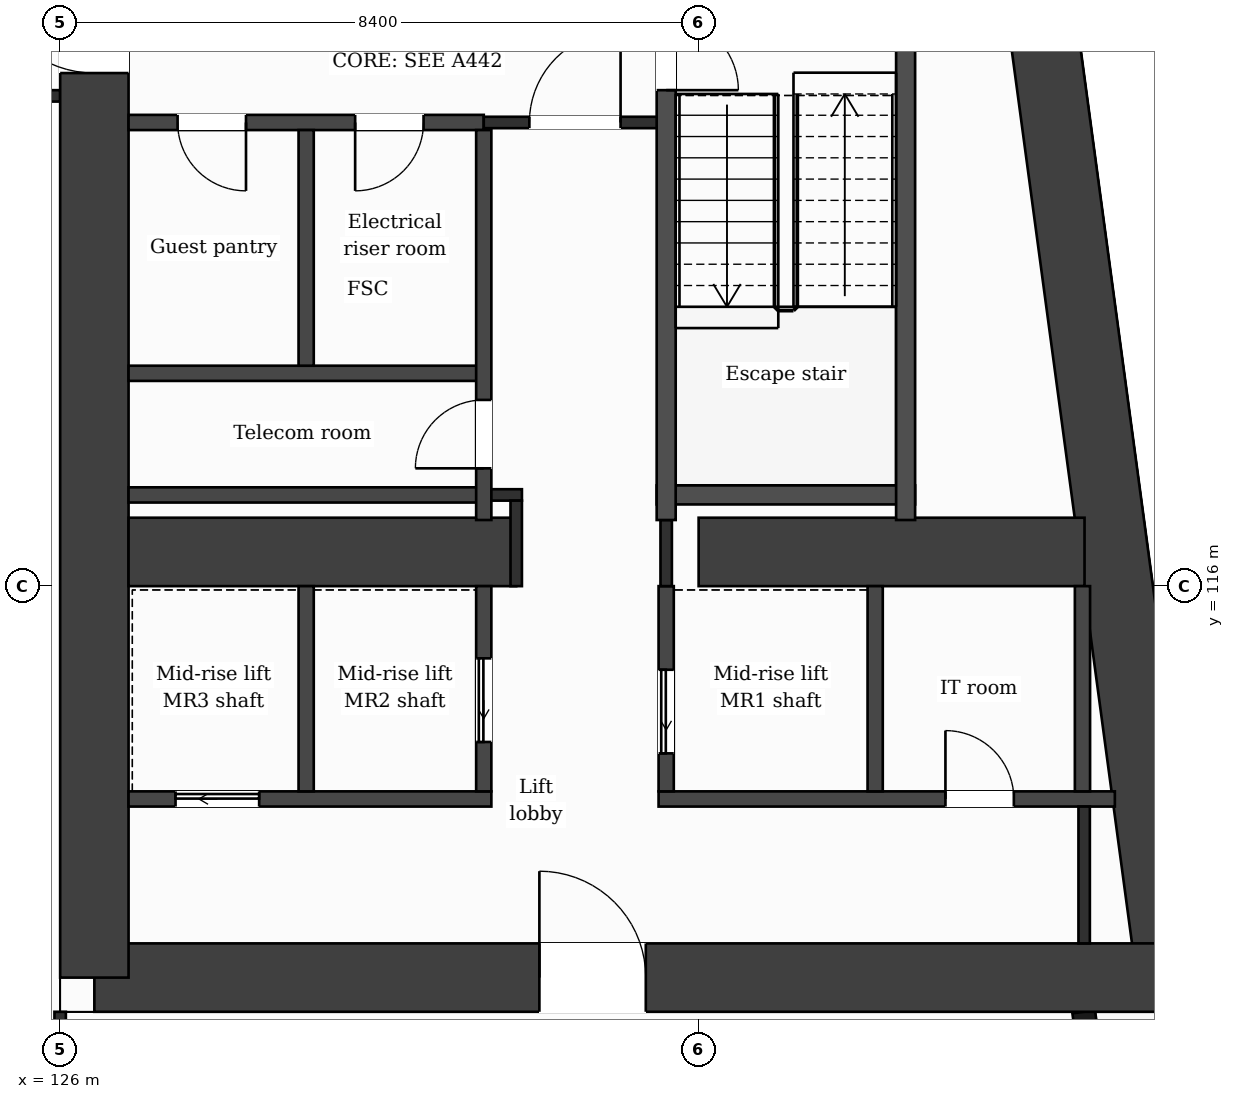
"""IFC4 building model, lengths in metres.
Left out: names, types, materials, properties, quantities, classifications, styles, units other than length and angle.
Written with IfcOpenShell. Run it as: python <this file> out.ifc"""

import sys

from ifc_helpers import new_model, si_unit, direction, frame, frame_2d, origin, place, context, subcontext, project, spatial, rectangle, extrude, element, fill, save


model = new_model("IFC4")
c1 = context("Model", 3, precision=1e-05, world=origin(), true_north=direction((0.0, 1.0)))
c2 = subcontext(c1, "Body", "Model", "MODEL_VIEW")
j1 = project(units=[si_unit("LENGTHUNIT", "METRE"), si_unit("PLANEANGLEUNIT", "RADIAN")], contexts=[c1])
p1 = place(None, origin())
s1 = spatial("IfcSite", under=j1, at=p1, CompositionType="ELEMENT")
p2 = place(p1, origin())
s2 = spatial("IfcBuilding", under=s1, at=p2, CompositionType="ELEMENT")
p3 = place(p2, frame((0.0, 0.0, 173.7)))
s3 = spatial("IfcBuildingStorey", under=s2, at=p3, CompositionType="ELEMENT", Elevation=173.7)
p4 = place(p3, frame((137.776, 131.95, 0.0), z_axis=(0.0, 0.0, 1.0), x_axis=(0.133421759112, -0.991059349482, 0.0)))
e1 = element("IfcWall", 1, at=p4, inside=s3, PredefinedType="SHEAR", context=c2, shape_type="SweptSolid", body=[
    extrude(rectangle(XDim=21.29, YDim=0.9, at=frame_2d((10.645, 0.0))), origin(), (0.0, 0.0, 1.0), 3.7),
])
p5 = place(p3, frame((140.616, 110.85, 0.0), z_axis=(0.0, 0.0, 1.0), x_axis=(-1.0, 0.0, 0.0)))
e2 = element("IfcWall", 2, at=p5, inside=s3, PredefinedType="SHEAR", context=c2, shape_type="SweptSolid", body=[
    extrude(rectangle(XDim=14.166, YDim=0.9, at=frame_2d((7.083, 0.0))), origin(), (0.0, 0.0, 1.0), 3.7),
])
p6 = place(p5, frame((6.911, 0.0, 0.0)))
e3 = element("IfcOpeningElement", 3, at=p6, cuts=e2, PredefinedType="OPENING", context=c2, shape_type="SweptSolid", body=[
    extrude(rectangle(XDim=1.4, YDim=2.1, at=frame_2d((0.7, 1.05))), frame((0.0, 0.46, 0.0), z_axis=(0.0, -1.0, 0.0), x_axis=(1.0, 0.0, 0.0)), (0.0, 0.0, 1.0), 0.92),
])
p7 = place(p3, frame((126.45, 110.85, 0.0), z_axis=(0.0, 0.0, 1.0), x_axis=(0.0, 1.0, 0.0)))
e4 = element("IfcWall", 4, at=p7, inside=s3, PredefinedType="SHEAR", context=c2, shape_type="SweptSolid", body=[
    extrude(rectangle(XDim=21.1, YDim=0.9, at=frame_2d((10.55, 0.0))), origin(), (0.0, 0.0, 1.0), 3.7),
])
p8 = place(p7, frame((11.9, 0.0, 0.0)))
e5 = element("IfcOpeningElement", 5, at=p8, cuts=e4, PredefinedType="OPENING", context=c2, shape_type="SweptSolid", body=[
    extrude(rectangle(XDim=1.4, YDim=2.1, at=frame_2d((0.7, 1.05))), frame((0.0, 0.46, 0.0), z_axis=(0.0, -1.0, 0.0), x_axis=(1.0, 0.0, 0.0)), (0.0, 0.0, 1.0), 0.92),
])
p9 = place(p3, frame((126.9, 116.45, 0.0), z_axis=(0.0, 0.0, 1.0), x_axis=(1.0, 0.0, 0.0)))
e6 = element("IfcWall", 6, at=p9, inside=s3, PredefinedType="SHEAR", context=c2, shape_type="SweptSolid", body=[
    extrude(rectangle(XDim=5.1, YDim=0.9, at=frame_2d((2.55, 0.0))), origin(), (0.0, 0.0, 1.0), 3.7),
])
p10 = place(p3, frame((134.4, 116.45, 0.0), z_axis=(0.0, 0.0, 1.0), x_axis=(1.0, 0.0, 0.0)))
e7 = element("IfcWall", 7, at=p10, inside=s3, PredefinedType="SHEAR", context=c2, shape_type="SweptSolid", body=[
    extrude(rectangle(XDim=5.077, YDim=0.9, at=frame_2d((2.539, 0.0))), origin(), (0.0, 0.0, 1.0), 3.7),
])
p11 = place(p3, frame((140.348, 103.85, 0.0), z_axis=(0.0, 0.0, 1.0), x_axis=(-0.133431549479, 0.991058031401, 0.0)))
e8 = element("IfcWall", 8, at=p11, inside=s3, PredefinedType="SOLIDWALL", context=c2, shape_type="SweptSolid", body=[
    extrude(rectangle(XDim=6.609, YDim=0.3, at=frame_2d((3.304, 0.0))), origin(), (0.0, 0.0, 1.0), 3.38),
])
p12 = place(p11, frame((0.737, 0.0, 0.9)))
e9 = element("IfcOpeningElement", 9, at=p12, cuts=e8, PredefinedType="OPENING", context=c2, shape_type="SweptSolid", body=[
    extrude(rectangle(XDim=1.2, YDim=2.1, at=frame_2d((0.6, 1.05))), frame((0.0, 0.16, 0.0), z_axis=(0.0, -1.0, 0.0), x_axis=(1.0, 0.0, 0.0)), (0.0, 0.0, 1.0), 0.32),
])
p13 = place(p11, frame((3.991, 0.0, 0.0)))
e10 = element("IfcOpeningElement", 10, at=p13, cuts=e8, PredefinedType="OPENING", context=c2, shape_type="SweptSolid", body=[
    extrude(rectangle(XDim=1.2, YDim=2.4, at=frame_2d((0.6, 1.2))), frame((0.0, 0.16, 0.0), z_axis=(0.0, -1.0, 0.0), x_axis=(1.0, 0.0, 0.0)), (0.0, 0.0, 1.0), 0.32),
])
p14 = place(p3, frame((126.9, 113.2, 0.0), z_axis=(0.0, 0.0, 1.0), x_axis=(1.0, 0.0, 0.0)))
e11 = element("IfcWall", 11, at=p14, inside=s3, PredefinedType="PARTITIONING", context=c2, shape_type="SweptSolid", body=[
    extrude(rectangle(XDim=4.773, YDim=0.2, at=frame_2d((2.387, 0.0))), origin(), (0.0, 0.0, 1.0), 3.38),
])
p15 = place(p14, frame((0.618, 0.0, 0.0)))
e12 = element("IfcOpeningElement", 12, at=p15, cuts=e11, PredefinedType="OPENING", context=c2, shape_type="SweptSolid", body=[
    extrude(rectangle(XDim=1.1, YDim=2.1, at=frame_2d((0.55, 1.05))), frame((0.0, 0.11, 0.0), z_axis=(0.0, -1.0, 0.0), x_axis=(1.0, 0.0, 0.0)), (0.0, 0.0, 1.0), 0.22),
])
p16 = place(p3, frame((133.873, 113.2, 0.0), z_axis=(0.0, 0.0, 1.0), x_axis=(1.0, 0.0, 0.0)))
e13 = element("IfcWall", 13, at=p16, inside=s3, PredefinedType="PARTITIONING", context=c2, shape_type="SweptSolid", body=[
    extrude(rectangle(XDim=6.003, YDim=0.2, at=frame_2d((3.001, 0.0))), origin(), (0.0, 0.0, 1.0), 3.38),
])
p17 = place(p16, frame((3.774, 0.0, 0.0)))
e14 = element("IfcOpeningElement", 14, at=p17, cuts=e13, PredefinedType="OPENING", context=c2, shape_type="SweptSolid", body=[
    extrude(rectangle(XDim=0.9, YDim=2.1, at=frame_2d((0.45, 1.05))), frame((0.0, 0.11, 0.0), z_axis=(0.0, -1.0, 0.0), x_axis=(1.0, 0.0, 0.0)), (0.0, 0.0, 1.0), 0.22),
])
p18 = place(p3, frame((126.9, 117.2, 0.0), z_axis=(0.0, 0.0, 1.0), x_axis=(1.0, 0.0, 0.0)))
e15 = element("IfcWall", 15, at=p18, inside=s3, PredefinedType="PARTITIONING", context=c2, shape_type="SweptSolid", body=[
    extrude(rectangle(XDim=4.673, YDim=0.2, at=frame_2d((2.336, 0.0))), origin(), (0.0, 0.0, 1.0), 3.38),
])
p19 = place(p3, frame((131.573, 117.2, 0.0), z_axis=(0.0, 0.0, 1.0), x_axis=(1.0, 0.0, 0.0)))
e16 = element("IfcWall", 16, at=p19, inside=s3, PredefinedType="PARTITIONING", context=c2, shape_type="SweptSolid", body=[
    extrude(rectangle(XDim=0.502, YDim=0.15, at=frame_2d((0.251, 0.0))), origin(), (0.0, 0.0, 1.0), 3.38),
])
p20 = place(p3, frame((133.848, 117.2, 0.0), z_axis=(0.0, 0.0, 1.0), x_axis=(1.0, 0.0, 0.0)))
e17 = element("IfcWall", 17, at=p20, inside=s3, PredefinedType="PARTITIONING", context=c2, shape_type="SweptSolid", body=[
    extrude(rectangle(XDim=3.4, YDim=0.25, at=frame_2d((1.7, 0.0))), origin(), (0.0, 0.0, 1.0), 3.38),
])
p21 = place(p3, frame((126.9, 118.8, 0.0), z_axis=(0.0, 0.0, 1.0), x_axis=(1.0, 0.0, 0.0)))
e18 = element("IfcWall", 18, at=p21, inside=s3, PredefinedType="PARTITIONING", context=c2, shape_type="SweptSolid", body=[
    extrude(rectangle(XDim=4.673, YDim=0.2, at=frame_2d((2.336, 0.0))), origin(), (0.0, 0.0, 1.0), 3.38),
])
p22 = place(p3, frame((126.9, 122.1, 0.0), z_axis=(0.0, 0.0, 1.0), x_axis=(1.0, 0.0, 0.0)))
e19 = element("IfcWall", 19, at=p22, inside=s3, PredefinedType="PARTITIONING", context=c2, shape_type="SweptSolid", body=[
    extrude(rectangle(XDim=4.673, YDim=0.2, at=frame_2d((2.336, 0.0))), origin(), (0.0, 0.0, 1.0), 3.38),
])
p23 = place(p22, frame((2.981, 0.0, 0.0)))
e20 = element("IfcOpeningElement", 20, at=p23, cuts=e19, PredefinedType="OPENING", context=c2, shape_type="SweptSolid", body=[
    extrude(rectangle(XDim=0.9, YDim=2.1, at=frame_2d((0.45, 1.05))), frame((0.0, 0.11, 0.0), z_axis=(0.0, -1.0, 0.0), x_axis=(1.0, 0.0, 0.0)), (0.0, 0.0, 1.0), 0.22),
])
p24 = place(p22, frame((0.645, 0.0, 0.0)))
e21 = element("IfcOpeningElement", 21, at=p24, cuts=e19, PredefinedType="OPENING", context=c2, shape_type="SweptSolid", body=[
    extrude(rectangle(XDim=0.9, YDim=2.1, at=frame_2d((0.45, 1.05))), frame((0.0, 0.11, 0.0), z_axis=(0.0, -1.0, 0.0), x_axis=(1.0, 0.0, 0.0)), (0.0, 0.0, 1.0), 0.22),
])
p25 = place(p3, frame((131.573, 122.1, 0.0), z_axis=(0.0, 0.0, 1.0), x_axis=(1.0, 0.0, 0.0)))
e22 = element("IfcWall", 22, at=p25, inside=s3, PredefinedType="PARTITIONING", context=c2, shape_type="SweptSolid", body=[
    extrude(rectangle(XDim=2.4, YDim=0.15, at=frame_2d((1.2, 0.0))), origin(), (0.0, 0.0, 1.0), 3.38),
])
p26 = place(p25, frame((0.6, 0.0, 0.0)))
e23 = element("IfcOpeningElement", 23, at=p26, cuts=e22, PredefinedType="OPENING", context=c2, shape_type="SweptSolid", body=[
    extrude(rectangle(XDim=1.2, YDim=2.1, at=frame_2d((0.6, 1.05))), frame((0.0, 0.085, 0.0), z_axis=(0.0, -1.0, 0.0), x_axis=(1.0, 0.0, 0.0)), (0.0, 0.0, 1.0), 0.17),
])
p27 = place(p3, frame((100.8, 122.45, 0.0), z_axis=(0.0, 0.0, 1.0), x_axis=(1.0, 0.0, 0.0)))
e24 = element("IfcWall", 24, at=p27, inside=s3, PredefinedType="PARTITIONING", context=c2, shape_type="SweptSolid", body=[
    extrude(rectangle(XDim=25.2, YDim=0.15, at=frame_2d((12.6, 0.0))), origin(), (0.0, 0.0, 1.0), 3.38),
])
p28 = place(p3, frame((126.0, 109.075, 0.0), z_axis=(0.0, 0.0, 1.0), x_axis=(0.0, 1.0, 0.0)))
e25 = element("IfcWall", 25, at=p28, inside=s3, PredefinedType="PARTITIONING", context=c2, shape_type="SweptSolid", body=[
    extrude(rectangle(XDim=1.325, YDim=0.15, at=frame_2d((0.663, 0.0))), origin(), (0.0, 0.0, 1.0), 3.38),
])
p29 = place(p3, frame((129.237, 113.3, 0.0), z_axis=(0.0, 0.0, 1.0), x_axis=(0.0, 1.0, 0.0)))
e26 = element("IfcWall", 26, at=p29, inside=s3, PredefinedType="PARTITIONING", context=c2, shape_type="SweptSolid", body=[
    extrude(rectangle(XDim=2.7, YDim=0.2, at=frame_2d((1.35, 0.0))), origin(), (0.0, 0.0, 1.0), 3.38),
])
p30 = place(p3, frame((129.237, 118.9, 0.0), z_axis=(0.0, 0.0, 1.0), x_axis=(0.0, 1.0, 0.0)))
e27 = element("IfcWall", 27, at=p30, inside=s3, PredefinedType="PARTITIONING", context=c2, shape_type="SweptSolid", body=[
    extrude(rectangle(XDim=3.1, YDim=0.2, at=frame_2d((1.55, 0.0))), origin(), (0.0, 0.0, 1.0), 3.38),
])
p31 = place(p3, frame((131.573, 113.3, 0.0), z_axis=(0.0, 0.0, 1.0), x_axis=(0.0, 1.0, 0.0)))
e28 = element("IfcWall", 28, at=p31, inside=s3, PredefinedType="PARTITIONING", context=c2, shape_type="SweptSolid", body=[
    extrude(rectangle(XDim=2.7, YDim=0.2, at=frame_2d((1.35, 0.0))), origin(), (0.0, 0.0, 1.0), 3.38),
])
p32 = place(p31, frame((0.65, 0.0, 0.0)))
e29 = element("IfcOpeningElement", 29, at=p32, cuts=e28, PredefinedType="OPENING", context=c2, shape_type="SweptSolid", body=[
    extrude(rectangle(XDim=1.1, YDim=2.1, at=frame_2d((0.55, 1.05))), frame((0.0, 0.11, 0.0), z_axis=(0.0, -1.0, 0.0), x_axis=(1.0, 0.0, 0.0)), (0.0, 0.0, 1.0), 0.22),
])
p33 = place(p3, frame((131.573, 116.87, 0.0), z_axis=(0.0, 0.0, 1.0), x_axis=(0.0, 1.0, 0.0)))
e30 = element("IfcWall", 30, at=p33, inside=s3, PredefinedType="PARTITIONING", context=c2, shape_type="SweptSolid", body=[
    extrude(rectangle(XDim=5.13, YDim=0.2, at=frame_2d((2.565, 0.0))), origin(), (0.0, 0.0, 1.0), 3.38),
])
p34 = place(p33, frame((0.68, 0.0, 0.0)))
e31 = element("IfcOpeningElement", 31, at=p34, cuts=e30, PredefinedType="OPENING", context=c2, shape_type="SweptSolid", body=[
    extrude(rectangle(XDim=0.9, YDim=2.1, at=frame_2d((0.45, 1.05))), frame((0.0, 0.11, 0.0), z_axis=(0.0, -1.0, 0.0), x_axis=(1.0, 0.0, 0.0)), (0.0, 0.0, 1.0), 0.22),
])
p35 = place(p3, frame((132.0, 116.0, 0.0), z_axis=(0.0, 0.0, 1.0), x_axis=(0.0, 1.0, 0.0)))
e32 = element("IfcWall", 32, at=p35, inside=s3, PredefinedType="PARTITIONING", context=c2, shape_type="SweptSolid", body=[
    extrude(rectangle(XDim=1.125, YDim=0.15, at=frame_2d((0.562, 0.0))), origin(), (0.0, 0.0, 1.0), 3.38),
])
p36 = place(p3, frame((133.973, 113.3, 0.0), z_axis=(0.0, 0.0, 1.0), x_axis=(0.0, 1.0, 0.0)))
e33 = element("IfcWall", 33, at=p36, inside=s3, PredefinedType="PARTITIONING", context=c2, shape_type="SweptSolid", body=[
    extrude(rectangle(XDim=2.7, YDim=0.2, at=frame_2d((1.35, 0.0))), origin(), (0.0, 0.0, 1.0), 3.38),
])
p37 = place(p36, frame((0.5, 0.0, 0.0)))
e34 = element("IfcOpeningElement", 34, at=p37, cuts=e33, PredefinedType="OPENING", context=c2, shape_type="SweptSolid", body=[
    extrude(rectangle(XDim=1.1, YDim=2.1, at=frame_2d((0.55, 1.05))), frame((0.0, 0.11, 0.0), z_axis=(0.0, -1.0, 0.0), x_axis=(1.0, 0.0, 0.0)), (0.0, 0.0, 1.0), 0.22),
])
p38 = place(p3, frame((133.973, 116.0, 0.0), z_axis=(0.0, 0.0, 1.0), x_axis=(0.0, 1.0, 0.0)))
e35 = element("IfcWall", 35, at=p38, inside=s3, PredefinedType="PARTITIONING", context=c2, shape_type="SweptSolid", body=[
    extrude(rectangle(XDim=0.87, YDim=0.15, at=frame_2d((0.435, 0.0))), origin(), (0.0, 0.0, 1.0), 3.38),
])
p39 = place(p3, frame((133.973, 116.87, 0.0), z_axis=(0.0, 0.0, 1.0), x_axis=(0.0, 1.0, 0.0)))
e36 = element("IfcWall", 36, at=p39, inside=s3, PredefinedType="PARTITIONING", context=c2, shape_type="SweptSolid", body=[
    extrude(rectangle(XDim=6.955, YDim=0.25, at=frame_2d((3.478, 0.0))), origin(), (0.0, 0.0, 1.0), 3.38),
])
p40 = place(p39, frame((5.655, 0.0, 0.0)))
e37 = element("IfcOpeningElement", 37, at=p40, cuts=e36, PredefinedType="OPENING", context=c2, shape_type="SweptSolid", body=[
    extrude(rectangle(XDim=0.95, YDim=2.1, at=frame_2d((0.475, 1.05))), frame((0.0, 0.135, 0.0), z_axis=(0.0, -1.0, 0.0), x_axis=(1.0, 0.0, 0.0)), (0.0, 0.0, 1.0), 0.27),
])
p41 = place(p3, frame((136.722, 113.3, 0.0), z_axis=(0.0, 0.0, 1.0), x_axis=(0.0, 1.0, 0.0)))
e38 = element("IfcWall", 38, at=p41, inside=s3, PredefinedType="PARTITIONING", context=c2, shape_type="SweptSolid", body=[
    extrude(rectangle(XDim=2.7, YDim=0.2, at=frame_2d((1.35, 0.0))), origin(), (0.0, 0.0, 1.0), 3.38),
])
p42 = place(p3, frame((137.123, 116.87, 0.0), z_axis=(0.0, 0.0, 1.0), x_axis=(0.0, 1.0, 0.0)))
e39 = element("IfcWall", 39, at=p42, inside=s3, PredefinedType="PARTITIONING", context=c2, shape_type="SweptSolid", body=[
    extrude(rectangle(XDim=6.955, YDim=0.25, at=frame_2d((3.478, 0.0))), origin(), (0.0, 0.0, 1.0), 3.38),
])
p43 = place(p3, frame((139.45, 113.3, 0.0), z_axis=(0.0, 0.0, 1.0), x_axis=(0.0, 1.0, 0.0)))
e40 = element("IfcWall", 40, at=p43, inside=s3, PredefinedType="PARTITIONING", context=c2, shape_type="SweptSolid", body=[
    extrude(rectangle(XDim=2.7, YDim=0.2, at=frame_2d((1.35, 0.0))), origin(), (0.0, 0.0, 1.0), 3.38),
])
p44 = place(p3, frame((139.472, 111.3, 0.0), z_axis=(0.0, 0.0, 1.0), x_axis=(0.0, 1.0, 0.0)))
e41 = element("IfcWall", 41, at=p44, inside=s3, PredefinedType="PARTITIONING", context=c2, shape_type="SweptSolid", body=[
    extrude(rectangle(XDim=1.8, YDim=0.15, at=frame_2d((0.9, 0.0))), origin(), (0.0, 0.0, 1.0), 3.38),
])
p45 = place(p26, origin())
e42 = element("IfcDoor", 42, at=p45, inside=s3, OperationType="SINGLE_SWING_RIGHT", PredefinedType="DOOR", context=c2, shape_type="SweptSolid", body=[
    extrude(rectangle(XDim=1.2, YDim=2.1, at=frame_2d((0.6, 1.05))), frame((0.0, 0.025, 0.0), z_axis=(0.0, -1.0, 0.0), x_axis=(1.0, 0.0, 0.0)), (0.0, 0.0, 1.0), 0.05),
])
fill(e23, e42)
p46 = place(p23, origin())
e43 = element("IfcDoor", 43, at=p46, inside=s3, OperationType="SINGLE_SWING_LEFT", PredefinedType="DOOR", context=c2, shape_type="SweptSolid", body=[
    extrude(rectangle(XDim=0.9, YDim=2.1, at=frame_2d((0.45, 1.05))), frame((0.0, 0.025, 0.0), z_axis=(0.0, -1.0, 0.0), x_axis=(1.0, 0.0, 0.0)), (0.0, 0.0, 1.0), 0.05),
])
fill(e20, e43)
p47 = place(p24, origin())
e44 = element("IfcDoor", 44, at=p47, inside=s3, OperationType="SINGLE_SWING_RIGHT", PredefinedType="DOOR", context=c2, shape_type="SweptSolid", body=[
    extrude(rectangle(XDim=0.9, YDim=2.1, at=frame_2d((0.45, 1.05))), frame((0.0, 0.025, 0.0), z_axis=(0.0, -1.0, 0.0), x_axis=(1.0, 0.0, 0.0)), (0.0, 0.0, 1.0), 0.05),
])
fill(e21, e44)
p48 = place(p40, origin())
e45 = element("IfcDoor", 45, at=p48, inside=s3, OperationType="SINGLE_SWING_LEFT", PredefinedType="DOOR", context=c2, shape_type="SweptSolid", body=[
    extrude(rectangle(XDim=0.95, YDim=2.1, at=frame_2d((0.475, 1.05))), frame((0.0, 0.025, 0.0), z_axis=(0.0, -1.0, 0.0), x_axis=(1.0, 0.0, 0.0)), (0.0, 0.0, 1.0), 0.05),
])
fill(e37, e45)
p49 = place(p34, origin())
e46 = element("IfcDoor", 46, at=p49, inside=s3, OperationType="SINGLE_SWING_LEFT", PredefinedType="DOOR", context=c2, shape_type="SweptSolid", body=[
    extrude(rectangle(XDim=0.9, YDim=2.1, at=frame_2d((0.45, 1.05))), frame((0.0, 0.025, 0.0), z_axis=(0.0, -1.0, 0.0), x_axis=(1.0, 0.0, 0.0)), (0.0, 0.0, 1.0), 0.05),
])
fill(e31, e46)
p50 = place(p37, origin())
e47 = element("IfcDoor", 47, at=p50, inside=s3, OperationType="SLIDING_TO_LEFT", PredefinedType="DOOR", context=c2, shape_type="SweptSolid", body=[
    extrude(rectangle(XDim=1.1, YDim=2.1, at=frame_2d((0.55, 1.05))), frame((0.0, 0.025, 0.0), z_axis=(0.0, -1.0, 0.0), x_axis=(1.0, 0.0, 0.0)), (0.0, 0.0, 1.0), 0.05),
])
fill(e34, e47)
p51 = place(p32, origin())
e48 = element("IfcDoor", 48, at=p51, inside=s3, OperationType="SLIDING_TO_LEFT", PredefinedType="DOOR", context=c2, shape_type="SweptSolid", body=[
    extrude(rectangle(XDim=1.1, YDim=2.1, at=frame_2d((0.55, 1.05))), frame((0.0, 0.025, 0.0), z_axis=(0.0, -1.0, 0.0), x_axis=(1.0, 0.0, 0.0)), (0.0, 0.0, 1.0), 0.05),
])
fill(e29, e48)
p52 = place(p15, origin())
e49 = element("IfcDoor", 49, at=p52, inside=s3, OperationType="SLIDING_TO_LEFT", PredefinedType="DOOR", context=c2, shape_type="SweptSolid", body=[
    extrude(rectangle(XDim=1.1, YDim=2.1, at=frame_2d((0.55, 1.05))), frame((0.0, 0.025, 0.0), z_axis=(0.0, -1.0, 0.0), x_axis=(1.0, 0.0, 0.0)), (0.0, 0.0, 1.0), 0.05),
])
fill(e12, e49)
p53 = place(p17, origin())
e50 = element("IfcDoor", 50, at=p53, inside=s3, OperationType="SINGLE_SWING_LEFT", PredefinedType="DOOR", context=c2, shape_type="SweptSolid", body=[
    extrude(rectangle(XDim=0.9, YDim=2.1, at=frame_2d((0.45, 1.05))), frame((0.0, 0.025, 0.0), z_axis=(0.0, -1.0, 0.0), x_axis=(1.0, 0.0, 0.0)), (0.0, 0.0, 1.0), 0.05),
])
fill(e14, e50)
p54 = place(p6, origin())
e51 = element("IfcDoor", 51, at=p54, inside=s3, OperationType="SINGLE_SWING_RIGHT", PredefinedType="DOOR", context=c2, shape_type="SweptSolid", body=[
    extrude(rectangle(XDim=1.4, YDim=2.1, at=frame_2d((0.7, 1.05))), frame((0.0, 0.025, 0.0), z_axis=(0.0, -1.0, 0.0), x_axis=(1.0, 0.0, 0.0)), (0.0, 0.0, 1.0), 0.05),
])
fill(e3, e51)
p55 = place(p8, origin())
e52 = element("IfcDoor", 52, at=p55, inside=s3, OperationType="SINGLE_SWING_RIGHT", PredefinedType="DOOR", context=c2, shape_type="SweptSolid", body=[
    extrude(rectangle(XDim=1.4, YDim=2.1, at=frame_2d((0.7, 1.05))), frame((0.0, 0.025, 0.0), z_axis=(0.0, -1.0, 0.0), x_axis=(1.0, 0.0, 0.0)), (0.0, 0.0, 1.0), 0.05),
])
fill(e5, e52)
save(model, sys.argv[1])
